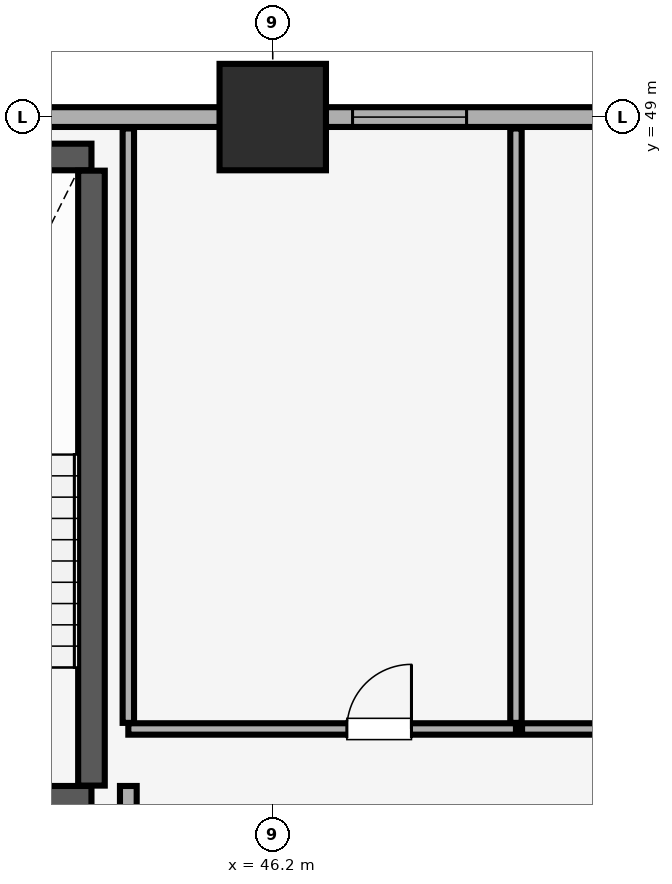
"""IFC4 building model, lengths in metres.
Left out: names, types, materials, properties, quantities, classifications, styles, units other than length and angle.
Written with IfcOpenShell. Run it as: python <this file> out.ifc"""

import sys

from ifc_helpers import new_model, si_unit, direction, frame, frame_2d, origin, origin_2d, place, context, subcontext, project, spatial, rectangle, extrude, element, fill, save


model = new_model("IFC4")
c1 = context("Model", 3, precision=1e-05, world=origin(), true_north=direction((0.0, 1.0)))
c2 = subcontext(c1, "Body", "Model", "MODEL_VIEW")
j1 = project(units=[si_unit("LENGTHUNIT", "METRE"), si_unit("PLANEANGLEUNIT", "RADIAN")], contexts=[c1])
p1 = place(None, origin())
s1 = spatial("IfcSite", under=j1, at=p1, CompositionType="ELEMENT")
p2 = place(p1, origin())
s2 = spatial("IfcBuilding", under=s1, at=p2, CompositionType="ELEMENT")
p3 = place(p2, frame((0.0, 0.0, 57.65)))
s3 = spatial("IfcBuildingStorey", under=s2, at=p3, CompositionType="ELEMENT", Elevation=57.65)
p4 = place(p3, frame((46.2, 49.0, 0.0), z_axis=(0.0, 0.0, 1.0), x_axis=(1.0, 0.0, 0.0)))
e1 = element("IfcColumn", 1, at=p4, inside=s3, PredefinedType="COLUMN", context=c2, shape_type="SweptSolid", body=[
    extrude(rectangle(XDim=1.4, YDim=1.4, at=origin_2d()), origin(), (0.0, 0.0, 1.0), 3.51),
])
p5 = place(p3, frame((79.8, 49.0, 0.0), z_axis=(0.0, 0.0, 1.0), x_axis=(-1.0, 0.0, 0.0)))
e2 = element("IfcWall", 2, at=p5, inside=s3, PredefinedType="SOLIDWALL", context=c2, shape_type="SweptSolid", body=[
    extrude(rectangle(XDim=75.6, YDim=0.26, at=frame_2d((37.8, 0.0))), origin(), (0.0, 0.0, 1.0), 2.56),
])
p6 = place(p5, frame((72.565, 0.0, 0.85)))
e3 = element("IfcOpeningElement", 3, at=p6, cuts=e2, PredefinedType="OPENING", context=c2, shape_type="SweptSolid", body=[
    extrude(rectangle(XDim=1.5, YDim=1.4, at=frame_2d((0.75, 0.7))), frame((0.0, 0.14, 0.0), z_axis=(0.0, -1.0, 0.0), x_axis=(1.0, 0.0, 0.0)), (0.0, 0.0, 1.0), 0.28),
])
p7 = place(p5, frame((67.45, 0.0, 0.85)))
e4 = element("IfcOpeningElement", 4, at=p7, cuts=e2, PredefinedType="OPENING", context=c2, shape_type="SweptSolid", body=[
    extrude(rectangle(XDim=1.5, YDim=1.4, at=frame_2d((0.75, 0.7))), frame((0.0, 0.14, 0.0), z_axis=(0.0, -1.0, 0.0), x_axis=(1.0, 0.0, 0.0)), (0.0, 0.0, 1.0), 0.28),
])
p8 = place(p5, frame((7.6, 0.0, 0.85)))
e5 = element("IfcOpeningElement", 5, at=p8, cuts=e2, PredefinedType="OPENING", context=c2, shape_type="SweptSolid", body=[
    extrude(rectangle(XDim=1.5, YDim=1.4, at=frame_2d((0.75, 0.7))), frame((0.0, 0.14, 0.0), z_axis=(0.0, -1.0, 0.0), x_axis=(1.0, 0.0, 0.0)), (0.0, 0.0, 1.0), 0.28),
])
p9 = place(p5, frame((1.535, 0.0, 0.85)))
e6 = element("IfcOpeningElement", 6, at=p9, cuts=e2, PredefinedType="OPENING", context=c2, shape_type="SweptSolid", body=[
    extrude(rectangle(XDim=1.5, YDim=1.4, at=frame_2d((0.75, 0.7))), frame((0.0, 0.14, 0.0), z_axis=(0.0, -1.0, 0.0), x_axis=(1.0, 0.0, 0.0)), (0.0, 0.0, 1.0), 0.28),
])
p10 = place(p5, frame((52.265, 0.0, 0.9)))
e7 = element("IfcOpeningElement", 7, at=p10, cuts=e2, PredefinedType="OPENING", context=c2, shape_type="SweptSolid", body=[
    extrude(rectangle(XDim=1.5, YDim=1.4, at=frame_2d((0.75, 0.7))), frame((0.0, 0.14, 0.0), z_axis=(0.0, -1.0, 0.0), x_axis=(1.0, 0.0, 0.0)), (0.0, 0.0, 1.0), 0.28),
])
p11 = place(p5, frame((45.5, 0.0, 0.9)))
e8 = element("IfcOpeningElement", 8, at=p11, cuts=e2, PredefinedType="OPENING", context=c2, shape_type="SweptSolid", body=[
    extrude(rectangle(XDim=1.5, YDim=1.4, at=frame_2d((0.75, 0.7))), frame((0.0, 0.14, 0.0), z_axis=(0.0, -1.0, 0.0), x_axis=(1.0, 0.0, 0.0)), (0.0, 0.0, 1.0), 0.28),
])
p12 = place(p5, frame((31.05, 0.0, 0.9)))
e9 = element("IfcOpeningElement", 9, at=p12, cuts=e2, PredefinedType="OPENING", context=c2, shape_type="SweptSolid", body=[
    extrude(rectangle(XDim=1.5, YDim=1.4, at=frame_2d((0.75, 0.7))), frame((0.0, 0.14, 0.0), z_axis=(0.0, -1.0, 0.0), x_axis=(1.0, 0.0, 0.0)), (0.0, 0.0, 1.0), 0.28),
])
p13 = place(p5, frame((27.85, 0.0, 0.9)))
e10 = element("IfcOpeningElement", 10, at=p13, cuts=e2, PredefinedType="OPENING", context=c2, shape_type="SweptSolid", body=[
    extrude(rectangle(XDim=1.5, YDim=1.4, at=frame_2d((0.75, 0.7))), frame((0.0, 0.14, 0.0), z_axis=(0.0, -1.0, 0.0), x_axis=(1.0, 0.0, 0.0)), (0.0, 0.0, 1.0), 0.28),
])
p14 = place(p5, frame((23.485, 0.0, 0.9)))
e11 = element("IfcOpeningElement", 11, at=p14, cuts=e2, PredefinedType="OPENING", context=c2, shape_type="SweptSolid", body=[
    extrude(rectangle(XDim=1.5, YDim=1.4, at=frame_2d((0.75, 0.7))), frame((0.0, 0.14, 0.0), z_axis=(0.0, -1.0, 0.0), x_axis=(1.0, 0.0, 0.0)), (0.0, 0.0, 1.0), 0.28),
])
p15 = place(p3, frame((40.185, 40.025, 0.0), z_axis=(0.0, 0.0, 1.0), x_axis=(1.0, 0.0, 0.0)))
e12 = element("IfcWall", 12, at=p15, inside=s3, PredefinedType="SHEAR", context=c2, shape_type="SweptSolid", body=[
    extrude(rectangle(XDim=3.63, YDim=0.35, at=frame_2d((1.815, 0.0))), origin(), (0.0, 0.0, 1.0), 3.51),
])
p16 = place(p15, frame((1.24, 0.0, 0.0)))
e13 = element("IfcOpeningElement", 13, at=p16, cuts=e12, PredefinedType="OPENING", context=c2, shape_type="SweptSolid", body=[
    extrude(rectangle(XDim=1.15, YDim=2.15, at=frame_2d((0.575, 1.075))), frame((0.0, 0.185, 0.0), z_axis=(0.0, -1.0, 0.0), x_axis=(1.0, 0.0, 0.0)), (0.0, 0.0, 1.0), 0.37),
])
p17 = place(p3, frame((40.185, 48.475, 0.0), z_axis=(0.0, 0.0, 1.0), x_axis=(1.0, 0.0, 0.0)))
e14 = element("IfcWall", 14, at=p17, inside=s3, PredefinedType="SHEAR", context=c2, shape_type="SweptSolid", body=[
    extrude(rectangle(XDim=3.63, YDim=0.35, at=frame_2d((1.815, 0.0))), origin(), (0.0, 0.0, 1.0), 3.51),
])
p18 = place(p3, frame((43.815, 40.205, 0.0), z_axis=(0.0, 0.0, 1.0), x_axis=(0.0, 1.0, 0.0)))
e15 = element("IfcWall", 15, at=p18, inside=s3, PredefinedType="SHEAR", context=c2, shape_type="SweptSolid", body=[
    extrude(rectangle(XDim=8.09, YDim=0.35, at=frame_2d((4.045, 0.0))), origin(), (0.0, 0.0, 1.0), 3.51),
])
p19 = place(p3, frame((44.3, 34.415, 0.0), z_axis=(0.0, 0.0, 1.0), x_axis=(0.0, 1.0, 0.0)))
e16 = element("IfcWall", 16, at=p19, inside=s3, PredefinedType="PARTITIONING", context=c2, shape_type="SweptSolid", body=[
    extrude(rectangle(XDim=5.785, YDim=0.22, at=frame_2d((2.893, 0.0))), origin(), (0.0, 0.0, 1.0), 3.51),
])
p20 = place(p3, frame((44.3, 40.95, 0.0), z_axis=(0.0, 0.0, 1.0), x_axis=(1.0, 0.0, 0.0)))
e17 = element("IfcWall", 17, at=p20, inside=s3, PredefinedType="PARTITIONING", context=c2, shape_type="SweptSolid", body=[
    extrude(rectangle(XDim=5.1, YDim=0.15, at=frame_2d((2.55, 0.0))), origin(), (0.0, 0.0, 1.0), 3.51),
])
p21 = place(p20, frame((2.875, 0.0, 0.0)))
e18 = element("IfcOpeningElement", 18, at=p21, cuts=e17, PredefinedType="OPENING", context=c2, shape_type="SweptSolid", body=[
    extrude(rectangle(XDim=0.85, YDim=2.1, at=frame_2d((0.425, 1.05))), frame((0.0, 0.085, 0.0), z_axis=(0.0, -1.0, 0.0), x_axis=(1.0, 0.0, 0.0)), (0.0, 0.0, 1.0), 0.17),
])
for number, where, z_axis, x_axis in (
    (19, (44.3, 41.03, 0.0), (0.0, 0.0, 1.0), (0.0, 1.0, 0.0)),
    (20, (49.4, 41.03, 0.0), (0.0, 0.0, 1.0), (0.0, 1.0, 0.0)),
):
    element("IfcWall", number, at=place(p3, frame(where, z_axis=z_axis, x_axis=x_axis)), inside=s3, PredefinedType="PARTITIONING", context=c2, shape_type="SweptSolid", body=[
        extrude(rectangle(XDim=7.82, YDim=0.15, at=frame_2d((3.91, 0.0))), origin(), (0.0, 0.0, 1.0), 3.51),
    ])
p22 = place(p3, frame((49.48, 40.95, 0.0), z_axis=(0.0, 0.0, 1.0), x_axis=(1.0, 0.0, 0.0)))
e21 = element("IfcWall", 21, at=p22, inside=s3, PredefinedType="PARTITIONING", context=c2, shape_type="SweptSolid", body=[
    extrude(rectangle(XDim=8.02, YDim=0.15, at=frame_2d((4.01, 0.0))), origin(), (0.0, 0.0, 1.0), 3.51),
])
p23 = place(p22, frame((4.72, 0.0, 0.0)))
e22 = element("IfcOpeningElement", 22, at=p23, cuts=e21, PredefinedType="OPENING", context=c2, shape_type="SweptSolid", body=[
    extrude(rectangle(XDim=1.0, YDim=2.15, at=frame_2d((0.5, 1.075))), frame((0.0, 0.085, 0.0), z_axis=(0.0, -1.0, 0.0), x_axis=(1.0, 0.0, 0.0)), (0.0, 0.0, 1.0), 0.17),
])
p24 = place(p12, origin())
e23 = element("IfcWindow", 23, at=p24, inside=s3, PartitioningType="SINGLE_PANEL", PredefinedType="WINDOW", context=c2, shape_type="SweptSolid", body=[
    extrude(rectangle(XDim=1.5, YDim=1.4, at=frame_2d((0.75, 0.7))), frame((0.0, 0.03, 0.0), z_axis=(0.0, -1.0, 0.0), x_axis=(1.0, 0.0, 0.0)), (0.0, 0.0, 1.0), 0.06),
])
fill(e9, e23)
p25 = place(p21, origin())
e24 = element("IfcDoor", 24, at=p25, inside=s3, OperationType="SINGLE_SWING_RIGHT", PredefinedType="DOOR", context=c2, shape_type="SweptSolid", body=[
    extrude(rectangle(XDim=0.85, YDim=2.1, at=frame_2d((0.425, 1.05))), frame((0.0, 0.025, 0.0), z_axis=(0.0, -1.0, 0.0), x_axis=(1.0, 0.0, 0.0)), (0.0, 0.0, 1.0), 0.05),
])
fill(e18, e24)
save(model, sys.argv[1])
